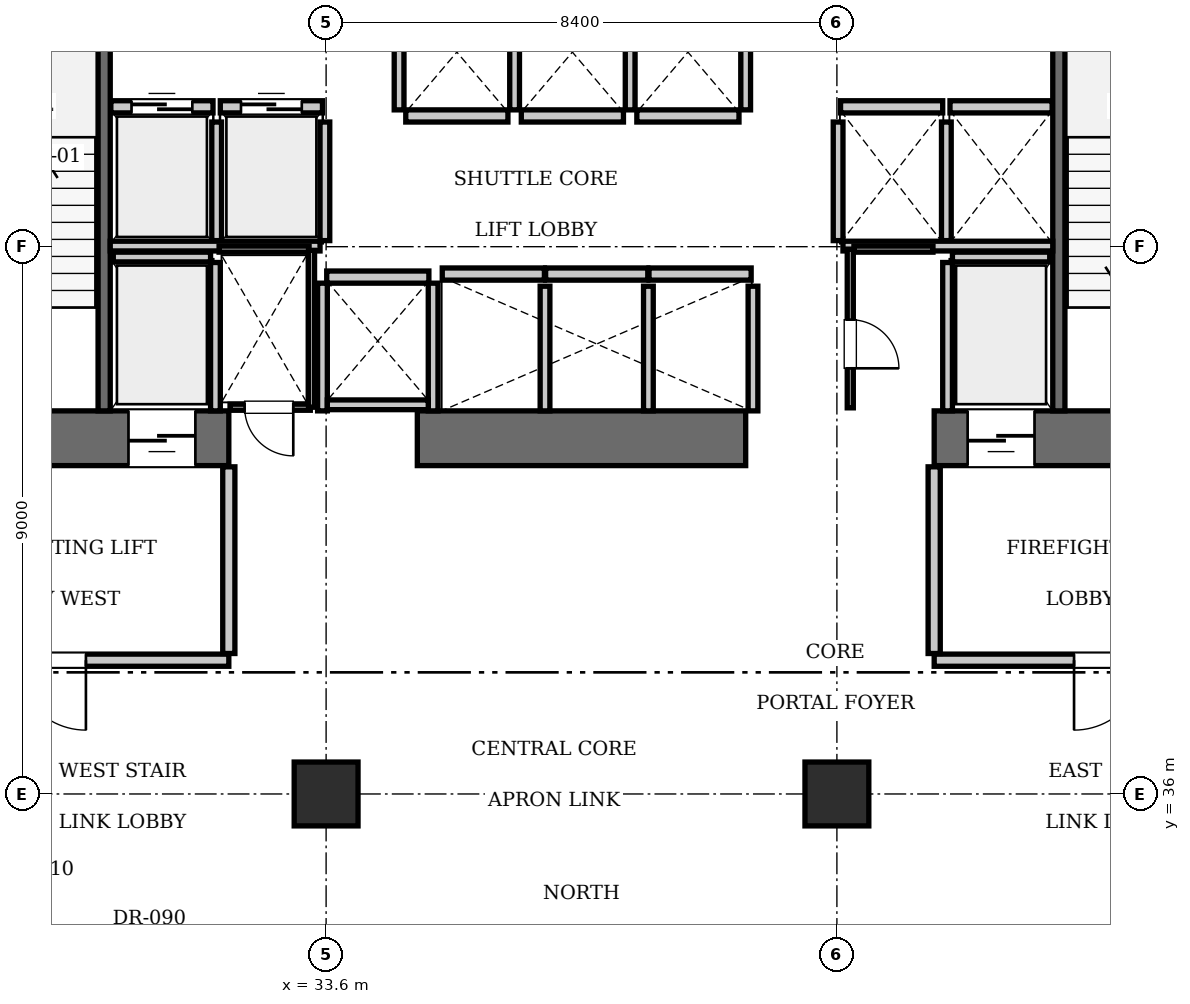
"""IFC4 building model, lengths in metres.
Left out: names, types, materials, properties, quantities, classifications, styles, units other than length and angle.
Written with IfcOpenShell. Run it as: python <this file> out.ifc"""

import sys

from ifc_helpers import new_model, si_unit, direction, frame, frame_2d, origin, origin_2d, place, context, subcontext, project, spatial, rectangle, extrude, element, fill, save


model = new_model("IFC4")
c1 = context("Model", 3, precision=1e-05, world=origin(), true_north=direction((0.0, 1.0)))
c2 = subcontext(c1, "Body", "Model", "MODEL_VIEW")
j1 = project(units=[si_unit("LENGTHUNIT", "METRE"), si_unit("PLANEANGLEUNIT", "RADIAN")], contexts=[c1])
p1 = place(None, origin())
s1 = spatial("IfcSite", under=j1, at=p1, CompositionType="ELEMENT")
p2 = place(p1, origin())
s2 = spatial("IfcBuilding", under=s1, at=p2, CompositionType="ELEMENT")
p3 = place(p2, frame((0.0, 0.0, 69.3)))
s3 = spatial("IfcBuildingStorey", under=s2, at=p3, CompositionType="ELEMENT", Elevation=69.3)
p4 = place(p3, frame((25.2, 41.85, 0.0), z_axis=(0.0, 0.0, 1.0), x_axis=(1.0, 0.0, 0.0)))
e1 = element("IfcWall", 1, at=p4, inside=s3, PredefinedType="SHEAR", context=c2, shape_type="SweptSolid", body=[
    extrude(rectangle(XDim=6.8, YDim=0.9, at=frame_2d((3.4, 0.0))), origin(), (0.0, 0.0, 1.0), 3.85),
])
p5 = place(p4, frame((1.65, 0.0, 0.0)))
e2 = element("IfcOpeningElement", 2, at=p5, cuts=e1, PredefinedType="OPENING", context=c2, shape_type="SweptSolid", body=[
    extrude(rectangle(XDim=1.15, YDim=2.15, at=frame_2d((0.575, 1.075))), frame((0.0, 0.46, 0.0), z_axis=(0.0, -1.0, 0.0), x_axis=(1.0, 0.0, 0.0)), (0.0, 0.0, 1.0), 0.92),
])
p6 = place(p4, frame((5.15, 0.0, 0.0)))
e3 = element("IfcOpeningElement", 3, at=p6, cuts=e1, PredefinedType="OPENING", context=c2, shape_type="SweptSolid", body=[
    extrude(rectangle(XDim=1.1, YDim=2.2, at=frame_2d((0.55, 1.1))), frame((0.0, 0.46, 0.0), z_axis=(0.0, -1.0, 0.0), x_axis=(1.0, 0.0, 0.0)), (0.0, 0.0, 1.0), 0.92),
])
p7 = place(p3, frame((35.1, 41.85, 0.0), z_axis=(0.0, 0.0, 1.0), x_axis=(1.0, 0.0, 0.0)))
e4 = element("IfcWall", 4, at=p7, inside=s3, PredefinedType="SHEAR", context=c2, shape_type="SweptSolid", body=[
    extrude(rectangle(XDim=5.4, YDim=0.9, at=frame_2d((2.7, 0.0))), origin(), (0.0, 0.0, 1.0), 3.85),
])
p8 = place(p3, frame((43.6, 41.85, 0.0), z_axis=(0.0, 0.0, 1.0), x_axis=(1.0, 0.0, 0.0)))
e5 = element("IfcWall", 5, at=p8, inside=s3, PredefinedType="SHEAR", context=c2, shape_type="SweptSolid", body=[
    extrude(rectangle(XDim=6.8, YDim=0.9, at=frame_2d((3.4, 0.0))), origin(), (0.0, 0.0, 1.0), 3.85),
])
p9 = place(p8, frame((3.9, 0.0, 0.0)))
e6 = element("IfcOpeningElement", 6, at=p9, cuts=e5, PredefinedType="OPENING", context=c2, shape_type="SweptSolid", body=[
    extrude(rectangle(XDim=1.15, YDim=2.15, at=frame_2d((0.575, 1.075))), frame((0.0, 0.46, 0.0), z_axis=(0.0, -1.0, 0.0), x_axis=(1.0, 0.0, 0.0)), (0.0, 0.0, 1.0), 0.92),
])
p10 = place(p8, frame((0.55, 0.0, 0.0)))
e7 = element("IfcOpeningElement", 7, at=p10, cuts=e5, PredefinedType="OPENING", context=c2, shape_type="SweptSolid", body=[
    extrude(rectangle(XDim=1.1, YDim=2.2, at=frame_2d((0.55, 1.1))), frame((0.0, 0.46, 0.0), z_axis=(0.0, -1.0, 0.0), x_axis=(1.0, 0.0, 0.0)), (0.0, 0.0, 1.0), 0.92),
])
for number, where, z_axis, x_axis in (
    (8, (33.6, 36.0, 0.0), (0.0, 0.0, 1.0), (1.0, 0.0, 0.0)),
    (9, (42.0, 36.0, 0.0), (0.0, 0.0, 1.0), (1.0, 0.0, 0.0)),
):
    element("IfcColumn", number, at=place(p3, frame(where, z_axis=z_axis, x_axis=x_axis)), inside=s3, PredefinedType="COLUMN", context=c2, shape_type="SweptSolid", body=[
        extrude(rectangle(XDim=1.05, YDim=1.05, at=origin_2d()), origin(), (0.0, 0.0, 1.0), 3.85),
    ])
for number, where, z_axis, x_axis in (
    (10, (29.95, 42.3, 0.0), (0.0, 0.0, 1.0), (0.0, 1.0, 0.0)),
    (11, (45.65, 42.3, 0.0), (0.0, 0.0, 1.0), (0.0, 1.0, 0.0)),
):
    element("IfcWall", number, at=place(p3, frame(where, z_axis=z_axis, x_axis=x_axis)), inside=s3, PredefinedType="SOLIDWALL", context=c2, shape_type="SweptSolid", body=[
        extrude(rectangle(XDim=8.85, YDim=0.2, at=frame_2d((4.425, 0.0))), origin(), (0.0, 0.0, 1.0), 3.61),
    ])
p11 = place(p3, frame((30.06, 47.3, 0.0), z_axis=(0.0, 0.0, 1.0), x_axis=(1.0, 0.0, 0.0)))
e12 = element("IfcWall", 12, at=p11, inside=s3, PredefinedType="SOLIDWALL", context=c2, shape_type="SweptSolid", body=[
    extrude(rectangle(XDim=1.68, YDim=0.2, at=frame_2d((0.84, 0.0))), origin(), (0.0, 0.0, 1.0), 3.61),
])
p12 = place(p11, frame((0.34, 0.0, 0.0)))
e13 = element("IfcOpeningElement", 13, at=p12, cuts=e12, PredefinedType="OPENING", context=c2, shape_type="SweptSolid", body=[
    extrude(rectangle(XDim=1.0, YDim=2.15, at=frame_2d((0.5, 1.075))), frame((0.0, 0.11, 0.0), z_axis=(0.0, -1.0, 0.0), x_axis=(1.0, 0.0, 0.0)), (0.0, 0.0, 1.0), 0.22),
])
p13 = place(p3, frame((31.86, 47.3, 0.0), z_axis=(0.0, 0.0, 1.0), x_axis=(1.0, 0.0, 0.0)))
e14 = element("IfcWall", 14, at=p13, inside=s3, PredefinedType="SOLIDWALL", context=c2, shape_type="SweptSolid", body=[
    extrude(rectangle(XDim=1.68, YDim=0.2, at=frame_2d((0.84, 0.0))), origin(), (0.0, 0.0, 1.0), 3.61),
])
p14 = place(p13, frame((0.34, 0.0, 0.0)))
e15 = element("IfcOpeningElement", 15, at=p14, cuts=e14, PredefinedType="OPENING", context=c2, shape_type="SweptSolid", body=[
    extrude(rectangle(XDim=1.0, YDim=2.15, at=frame_2d((0.5, 1.075))), frame((0.0, 0.11, 0.0), z_axis=(0.0, -1.0, 0.0), x_axis=(1.0, 0.0, 0.0)), (0.0, 0.0, 1.0), 0.22),
])
for number, where, z_axis, x_axis in (
    (16, (42.06, 47.3, 0.0), (0.0, 0.0, 1.0), (1.0, 0.0, 0.0)),
    (17, (43.86, 47.3, 0.0), (0.0, 0.0, 1.0), (1.0, 0.0, 0.0)),
    (18, (35.51, 44.55, 0.0), (0.0, 0.0, 1.0), (1.0, 0.0, 0.0)),
    (19, (37.21, 44.55, 0.0), (0.0, 0.0, 1.0), (1.0, 0.0, 0.0)),
):
    element("IfcWall", number, at=place(p3, frame(where, z_axis=z_axis, x_axis=x_axis)), inside=s3, PredefinedType="SOLIDWALL", context=c2, shape_type="SweptSolid", body=[
        extrude(rectangle(XDim=1.68, YDim=0.2, at=frame_2d((0.84, 0.0))), origin(), (0.0, 0.0, 1.0), 3.61),
    ])
for number, where, z_axis, x_axis in (
    (20, (38.91, 44.55, 0.0), (0.0, 0.0, 1.0), (1.0, 0.0, 0.0)),
    (21, (34.91, 47.15, 0.0), (0.0, 0.0, 1.0), (1.0, 0.0, 0.0)),
):
    element("IfcWall", number, at=place(p3, frame(where, z_axis=z_axis, x_axis=x_axis)), inside=s3, PredefinedType="SOLIDWALL", context=c2, shape_type="SweptSolid", body=[
        extrude(rectangle(XDim=1.68, YDim=0.2, at=frame_2d((0.84, 0.0))), origin(), (0.0, 0.0, 1.0), 3.61),
    ])
for number, where, z_axis, x_axis in (
    (22, (36.81, 47.15, 0.0), (0.0, 0.0, 1.0), (1.0, 0.0, 0.0)),
    (23, (38.71, 47.15, 0.0), (0.0, 0.0, 1.0), (1.0, 0.0, 0.0)),
    (24, (33.61, 44.5, 0.0), (0.0, 0.0, 1.0), (1.0, 0.0, 0.0)),
):
    element("IfcWall", number, at=place(p3, frame(where, z_axis=z_axis, x_axis=x_axis)), inside=s3, PredefinedType="SOLIDWALL", context=c2, shape_type="SweptSolid", body=[
        extrude(rectangle(XDim=1.68, YDim=0.2, at=frame_2d((0.84, 0.0))), origin(), (0.0, 0.0, 1.0), 3.61),
    ])
p15 = place(p3, frame((30.1, 44.83, 0.0), z_axis=(0.0, 0.0, 1.0), x_axis=(1.0, 0.0, 0.0)))
e25 = element("IfcWall", 25, at=p15, inside=s3, PredefinedType="SOLIDWALL", context=c2, shape_type="SweptSolid", body=[
    extrude(rectangle(XDim=1.6, YDim=0.16, at=frame_2d((0.8, 0.0))), origin(), (0.0, 0.0, 1.0), 3.61),
])
p16 = place(p3, frame((31.78, 42.3, 0.0), z_axis=(0.0, 0.0, 1.0), x_axis=(0.0, 1.0, 0.0)))
e26 = element("IfcWall", 26, at=p16, inside=s3, PredefinedType="SOLIDWALL", context=c2, shape_type="SweptSolid", body=[
    extrude(rectangle(XDim=2.44, YDim=0.16, at=frame_2d((1.22, 0.0))), origin(), (0.0, 0.0, 1.0), 3.61),
])
p17 = place(p3, frame((43.9, 44.83, 0.0), z_axis=(0.0, 0.0, 1.0), x_axis=(1.0, 0.0, 0.0)))
e27 = element("IfcWall", 27, at=p17, inside=s3, PredefinedType="SOLIDWALL", context=c2, shape_type="SweptSolid", body=[
    extrude(rectangle(XDim=1.6, YDim=0.16, at=frame_2d((0.8, 0.0))), origin(), (0.0, 0.0, 1.0), 3.61),
])
p18 = place(p3, frame((43.82, 42.3, 0.0), z_axis=(0.0, 0.0, 1.0), x_axis=(0.0, 1.0, 0.0)))
e28 = element("IfcWall", 28, at=p18, inside=s3, PredefinedType="SOLIDWALL", context=c2, shape_type="SweptSolid", body=[
    extrude(rectangle(XDim=2.44, YDim=0.16, at=frame_2d((1.22, 0.0))), origin(), (0.0, 0.0, 1.0), 3.61),
])
for number, where, z_axis, x_axis in (
    (29, (31.8, 45.1, 0.0), (0.0, 0.0, 1.0), (0.0, 1.0, 0.0)),
    (30, (33.58, 45.1, 0.0), (0.0, 0.0, 1.0), (0.0, 1.0, 0.0)),
):
    element("IfcWall", number, at=place(p3, frame(where, z_axis=z_axis, x_axis=x_axis)), inside=s3, PredefinedType="SOLIDWALL", context=c2, shape_type="SweptSolid", body=[
        extrude(rectangle(XDim=1.95, YDim=0.16, at=frame_2d((0.975, 0.0))), origin(), (0.0, 0.0, 1.0), 3.61),
    ])
p19 = place(p3, frame((30.05, 45.01, 0.0), z_axis=(0.0, 0.0, 1.0), x_axis=(1.0, 0.0, 0.0)))
e31 = element("IfcWall", 31, at=p19, inside=s3, PredefinedType="SOLIDWALL", context=c2, shape_type="SweptSolid", body=[
    extrude(rectangle(XDim=3.45, YDim=0.16, at=frame_2d((1.725, 0.0))), origin(), (0.0, 0.0, 1.0), 3.61),
])
for number, where, z_axis, x_axis in (
    (32, (42.02, 45.1, 0.0), (0.0, 0.0, 1.0), (0.0, 1.0, 0.0)),
    (33, (43.8, 45.1, 0.0), (0.0, 0.0, 1.0), (0.0, 1.0, 0.0)),
):
    element("IfcWall", number, at=place(p3, frame(where, z_axis=z_axis, x_axis=x_axis)), inside=s3, PredefinedType="SOLIDWALL", context=c2, shape_type="SweptSolid", body=[
        extrude(rectangle(XDim=1.95, YDim=0.16, at=frame_2d((0.975, 0.0))), origin(), (0.0, 0.0, 1.0), 3.61),
    ])
p20 = place(p3, frame((42.1, 45.01, 0.0), z_axis=(0.0, 0.0, 1.0), x_axis=(1.0, 0.0, 0.0)))
e34 = element("IfcWall", 34, at=p20, inside=s3, PredefinedType="SOLIDWALL", context=c2, shape_type="SweptSolid", body=[
    extrude(rectangle(XDim=3.45, YDim=0.16, at=frame_2d((1.725, 0.0))), origin(), (0.0, 0.0, 1.0), 3.61),
])
for number, where, z_axis, x_axis in (
    (35, (37.2, 42.3, 0.0), (0.0, 0.0, 1.0), (0.0, 1.0, 0.0)),
    (36, (38.9, 42.3, 0.0), (0.0, 0.0, 1.0), (0.0, 1.0, 0.0)),
    (37, (40.62, 42.3, 0.0), (0.0, 0.0, 1.0), (0.0, 1.0, 0.0)),
):
    element("IfcWall", number, at=place(p3, frame(where, z_axis=z_axis, x_axis=x_axis)), inside=s3, PredefinedType="SOLIDWALL", context=c2, shape_type="SweptSolid", body=[
        extrude(rectangle(XDim=2.05, YDim=0.16, at=frame_2d((1.025, 0.0))), origin(), (0.0, 0.0, 1.0), 3.61),
    ])
for number, where, z_axis, x_axis in (
    (38, (34.8, 47.25, 0.0), (0.0, 0.0, 1.0), (0.0, 1.0, 0.0)),
    (39, (36.7, 47.25, 0.0), (0.0, 0.0, 1.0), (0.0, 1.0, 0.0)),
    (40, (38.6, 47.25, 0.0), (0.0, 0.0, 1.0), (0.0, 1.0, 0.0)),
    (41, (40.5, 47.25, 0.0), (0.0, 0.0, 1.0), (0.0, 1.0, 0.0)),
):
    element("IfcWall", number, at=place(p3, frame(where, z_axis=z_axis, x_axis=x_axis)), inside=s3, PredefinedType="SOLIDWALL", context=c2, shape_type="SweptSolid", body=[
        extrude(rectangle(XDim=2.19, YDim=0.16, at=frame_2d((1.095, 0.0))), origin(), (0.0, 0.0, 1.0), 3.61),
    ])
for number, where, z_axis, x_axis in (
    (42, (33.54, 42.3, 0.0), (0.0, 0.0, 1.0), (0.0, 1.0, 0.0)),
    (43, (35.36, 42.3, 0.0), (0.0, 0.0, 1.0), (0.0, 1.0, 0.0)),
):
    element("IfcWall", number, at=place(p3, frame(where, z_axis=z_axis, x_axis=x_axis)), inside=s3, PredefinedType="SOLIDWALL", context=c2, shape_type="SweptSolid", body=[
        extrude(rectangle(XDim=2.1, YDim=0.16, at=frame_2d((1.05, 0.0))), origin(), (0.0, 0.0, 1.0), 3.61),
    ])
p21 = place(p3, frame((33.62, 42.4, 0.0), z_axis=(0.0, 0.0, 1.0), x_axis=(1.0, 0.0, 0.0)))
e44 = element("IfcWall", 44, at=p21, inside=s3, PredefinedType="SOLIDWALL", context=c2, shape_type="SweptSolid", body=[
    extrude(rectangle(XDim=1.66, YDim=0.16, at=frame_2d((0.83, 0.0))), origin(), (0.0, 0.0, 1.0), 3.61),
])
p22 = place(p3, frame((26.2, 38.2, 0.0), z_axis=(0.0, 0.0, 1.0), x_axis=(1.0, 0.0, 0.0)))
e45 = element("IfcWall", 45, at=p22, inside=s3, PredefinedType="PARTITIONING", context=c2, shape_type="SweptSolid", body=[
    extrude(rectangle(XDim=5.8, YDim=0.2, at=frame_2d((2.9, 0.0))), origin(), (0.0, 0.0, 1.0), 3.61),
])
p23 = place(p22, frame((2.3, 0.0, 0.0)))
e46 = element("IfcOpeningElement", 46, at=p23, cuts=e45, PredefinedType="OPENING", context=c2, shape_type="SweptSolid", body=[
    extrude(rectangle(XDim=1.15, YDim=2.15, at=frame_2d((0.575, 1.075))), frame((0.0, 0.11, 0.0), z_axis=(0.0, -1.0, 0.0), x_axis=(1.0, 0.0, 0.0)), (0.0, 0.0, 1.0), 0.22),
])
p24 = place(p3, frame((32.0, 38.31, 0.0), z_axis=(0.0, 0.0, 1.0), x_axis=(0.0, 1.0, 0.0)))
e47 = element("IfcWall", 47, at=p24, inside=s3, PredefinedType="PARTITIONING", context=c2, shape_type="SweptSolid", body=[
    extrude(rectangle(XDim=3.07, YDim=0.2, at=frame_2d((1.535, 0.0))), origin(), (0.0, 0.0, 1.0), 3.61),
])
p25 = place(p3, frame((43.6, 38.2, 0.0), z_axis=(0.0, 0.0, 1.0), x_axis=(1.0, 0.0, 0.0)))
e48 = element("IfcWall", 48, at=p25, inside=s3, PredefinedType="PARTITIONING", context=c2, shape_type="SweptSolid", body=[
    extrude(rectangle(XDim=5.8, YDim=0.2, at=frame_2d((2.9, 0.0))), origin(), (0.0, 0.0, 1.0), 3.61),
])
p26 = place(p25, frame((2.3, 0.0, 0.0)))
e49 = element("IfcOpeningElement", 49, at=p26, cuts=e48, PredefinedType="OPENING", context=c2, shape_type="SweptSolid", body=[
    extrude(rectangle(XDim=1.15, YDim=2.15, at=frame_2d((0.575, 1.075))), frame((0.0, 0.11, 0.0), z_axis=(0.0, -1.0, 0.0), x_axis=(1.0, 0.0, 0.0)), (0.0, 0.0, 1.0), 0.22),
])
p27 = place(p3, frame((43.6, 38.31, 0.0), z_axis=(0.0, 0.0, 1.0), x_axis=(0.0, 1.0, 0.0)))
e50 = element("IfcWall", 50, at=p27, inside=s3, PredefinedType="PARTITIONING", context=c2, shape_type="SweptSolid", body=[
    extrude(rectangle(XDim=3.07, YDim=0.2, at=frame_2d((1.535, 0.0))), origin(), (0.0, 0.0, 1.0), 3.61),
])
p28 = place(p3, frame((32.02, 42.36, 0.0), z_axis=(0.0, 0.0, 1.0), x_axis=(1.0, 0.0, 0.0)))
e51 = element("IfcWall", 51, at=p28, inside=s3, PredefinedType="PARTITIONING", context=c2, shape_type="SweptSolid", body=[
    extrude(rectangle(XDim=1.32, YDim=0.1, at=frame_2d((0.66, 0.0))), origin(), (0.0, 0.0, 1.0), 3.61),
])
p29 = place(p28, frame((0.24, 0.0, 0.0)))
e52 = element("IfcOpeningElement", 52, at=p29, cuts=e51, PredefinedType="OPENING", context=c2, shape_type="SweptSolid", body=[
    extrude(rectangle(XDim=0.8, YDim=2.05, at=frame_2d((0.4, 1.025))), frame((0.0, 0.06, 0.0), z_axis=(0.0, -1.0, 0.0), x_axis=(1.0, 0.0, 0.0)), (0.0, 0.0, 1.0), 0.12),
])
p30 = place(p3, frame((31.84, 44.96, 0.0), z_axis=(0.0, 0.0, 1.0), x_axis=(1.0, 0.0, 0.0)))
e53 = element("IfcWall", 53, at=p30, inside=s3, PredefinedType="PARTITIONING", context=c2, shape_type="SweptSolid", body=[
    extrude(rectangle(XDim=1.48, YDim=0.1, at=frame_2d((0.74, 0.0))), origin(), (0.0, 0.0, 1.0), 3.61),
])
p31 = place(p3, frame((33.36, 42.36, 0.0), z_axis=(0.0, 0.0, 1.0), x_axis=(0.0, 1.0, 0.0)))
e54 = element("IfcWall", 54, at=p31, inside=s3, PredefinedType="PARTITIONING", context=c2, shape_type="SweptSolid", body=[
    extrude(rectangle(XDim=2.58, YDim=0.1, at=frame_2d((1.29, 0.0))), origin(), (0.0, 0.0, 1.0), 3.61),
])
p32 = place(p3, frame((42.22, 42.35, 0.0), z_axis=(0.0, 0.0, 1.0), x_axis=(0.0, 1.0, 0.0)))
e55 = element("IfcWall", 55, at=p32, inside=s3, PredefinedType="PARTITIONING", context=c2, shape_type="SweptSolid", body=[
    extrude(rectangle(XDim=2.61, YDim=0.1, at=frame_2d((1.305, 0.0))), origin(), (0.0, 0.0, 1.0), 3.61),
])
p33 = place(p32, frame((0.65, 0.0, 0.0)))
e56 = element("IfcOpeningElement", 56, at=p33, cuts=e55, PredefinedType="OPENING", context=c2, shape_type="SweptSolid", body=[
    extrude(rectangle(XDim=0.8, YDim=2.05, at=frame_2d((0.4, 1.025))), frame((0.0, 0.06, 0.0), z_axis=(0.0, -1.0, 0.0), x_axis=(1.0, 0.0, 0.0)), (0.0, 0.0, 1.0), 0.12),
])
p34 = place(p3, frame((42.28, 44.96, 0.0), z_axis=(0.0, 0.0, 1.0), x_axis=(1.0, 0.0, 0.0)))
e57 = element("IfcWall", 57, at=p34, inside=s3, PredefinedType="PARTITIONING", context=c2, shape_type="SweptSolid", body=[
    extrude(rectangle(XDim=1.3, YDim=0.1, at=frame_2d((0.65, 0.0))), origin(), (0.0, 0.0, 1.0), 3.61),
])
p35 = place(p12, origin())
e58 = element("IfcDoor", 58, at=p35, inside=s3, OperationType="SLIDING_TO_LEFT", PredefinedType="DOOR", context=c2, shape_type="SweptSolid", body=[
    extrude(rectangle(XDim=1.0, YDim=2.15, at=frame_2d((0.5, 1.075))), frame((0.0, 0.025, 0.0), z_axis=(0.0, -1.0, 0.0), x_axis=(1.0, 0.0, 0.0)), (0.0, 0.0, 1.0), 0.05),
])
fill(e13, e58)
p36 = place(p14, origin())
e59 = element("IfcDoor", 59, at=p36, inside=s3, OperationType="SLIDING_TO_LEFT", PredefinedType="DOOR", context=c2, shape_type="SweptSolid", body=[
    extrude(rectangle(XDim=1.0, YDim=2.15, at=frame_2d((0.5, 1.075))), frame((0.0, 0.025, 0.0), z_axis=(0.0, -1.0, 0.0), x_axis=(1.0, 0.0, 0.0)), (0.0, 0.0, 1.0), 0.05),
])
fill(e15, e59)
p37 = place(p6, frame((1.1, 0.0, 0.0), z_axis=(0.0, 0.0, 1.0), x_axis=(-1.0, 0.0, 0.0)))
e60 = element("IfcDoor", 60, at=p37, inside=s3, OperationType="SLIDING_TO_LEFT", PredefinedType="DOOR", context=c2, shape_type="SweptSolid", body=[
    extrude(rectangle(XDim=1.1, YDim=2.2, at=frame_2d((0.55, 1.1))), frame((0.0, 0.025, 0.0), z_axis=(0.0, -1.0, 0.0), x_axis=(1.0, 0.0, 0.0)), (0.0, 0.0, 1.0), 0.05),
])
fill(e3, e60)
p38 = place(p10, frame((1.1, 0.0, 0.0), z_axis=(0.0, 0.0, 1.0), x_axis=(-1.0, 0.0, 0.0)))
e61 = element("IfcDoor", 61, at=p38, inside=s3, OperationType="SLIDING_TO_LEFT", PredefinedType="DOOR", context=c2, shape_type="SweptSolid", body=[
    extrude(rectangle(XDim=1.1, YDim=2.2, at=frame_2d((0.55, 1.1))), frame((0.0, 0.025, 0.0), z_axis=(0.0, -1.0, 0.0), x_axis=(1.0, 0.0, 0.0)), (0.0, 0.0, 1.0), 0.05),
])
fill(e7, e61)
p39 = place(p23, frame((1.15, 0.0, 0.0), z_axis=(0.0, 0.0, 1.0), x_axis=(-1.0, 0.0, 0.0)))
e62 = element("IfcDoor", 62, at=p39, inside=s3, OperationType="SINGLE_SWING_LEFT", PredefinedType="DOOR", context=c2, shape_type="SweptSolid", body=[
    extrude(rectangle(XDim=1.15, YDim=2.15, at=frame_2d((0.575, 1.075))), frame((0.0, 0.025, 0.0), z_axis=(0.0, -1.0, 0.0), x_axis=(1.0, 0.0, 0.0)), (0.0, 0.0, 1.0), 0.05),
])
fill(e46, e62)
p40 = place(p26, frame((1.15, 0.0, 0.0), z_axis=(0.0, 0.0, 1.0), x_axis=(-1.0, 0.0, 0.0)))
e63 = element("IfcDoor", 63, at=p40, inside=s3, OperationType="SINGLE_SWING_RIGHT", PredefinedType="DOOR", context=c2, shape_type="SweptSolid", body=[
    extrude(rectangle(XDim=1.15, YDim=2.15, at=frame_2d((0.575, 1.075))), frame((0.0, 0.025, 0.0), z_axis=(0.0, -1.0, 0.0), x_axis=(1.0, 0.0, 0.0)), (0.0, 0.0, 1.0), 0.05),
])
fill(e49, e63)
p41 = place(p29, frame((0.8, 0.0, 0.0), z_axis=(0.0, 0.0, 1.0), x_axis=(-1.0, 0.0, 0.0)))
e64 = element("IfcDoor", 64, at=p41, inside=s3, OperationType="SINGLE_SWING_LEFT", PredefinedType="DOOR", context=c2, shape_type="SweptSolid", body=[
    extrude(rectangle(XDim=0.8, YDim=2.05, at=frame_2d((0.4, 1.025))), frame((0.0, 0.025, 0.0), z_axis=(0.0, -1.0, 0.0), x_axis=(1.0, 0.0, 0.0)), (0.0, 0.0, 1.0), 0.05),
])
fill(e52, e64)
p42 = place(p33, frame((0.8, 0.0, 0.0), z_axis=(0.0, 0.0, 1.0), x_axis=(-1.0, 0.0, 0.0)))
e65 = element("IfcDoor", 65, at=p42, inside=s3, OperationType="SINGLE_SWING_RIGHT", PredefinedType="DOOR", context=c2, shape_type="SweptSolid", body=[
    extrude(rectangle(XDim=0.8, YDim=2.05, at=frame_2d((0.4, 1.025))), frame((0.0, 0.025, 0.0), z_axis=(0.0, -1.0, 0.0), x_axis=(1.0, 0.0, 0.0)), (0.0, 0.0, 1.0), 0.05),
])
fill(e56, e65)
save(model, sys.argv[1])
